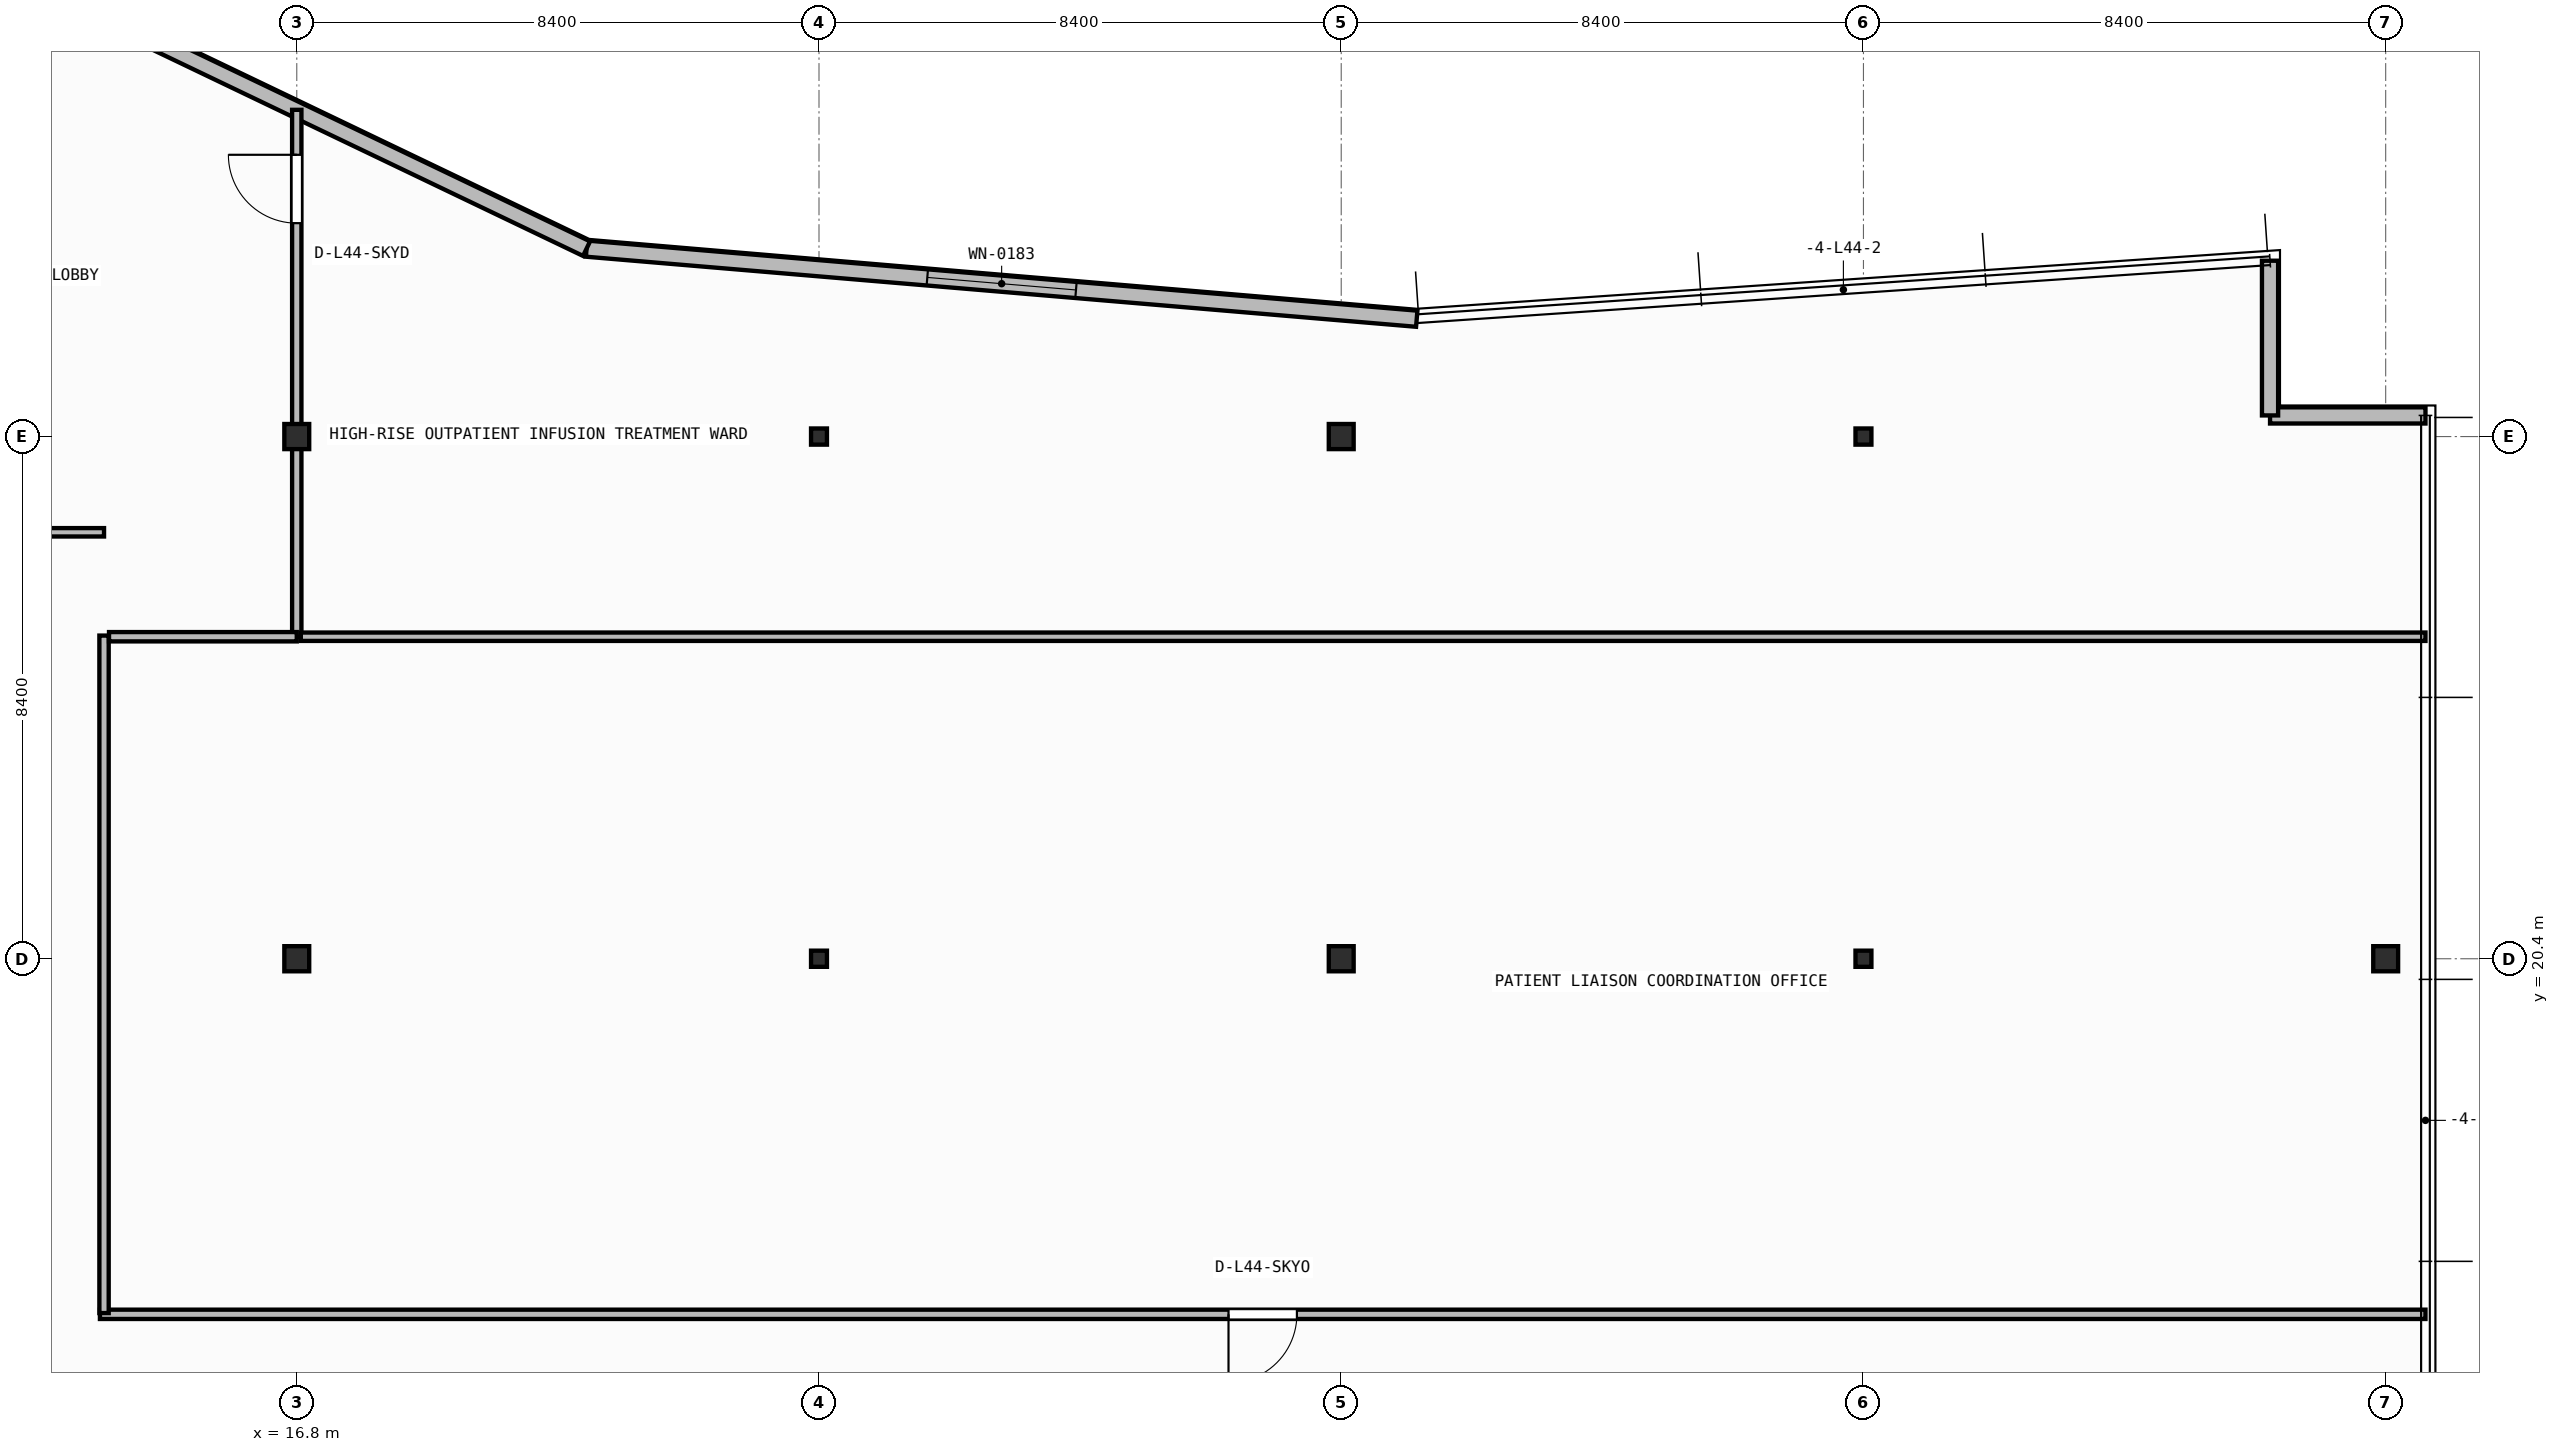
"""IFC4 building model, lengths in metres.
Left out: names, types, materials, properties, quantities, classifications, styles, units other than length and angle.
Written with IfcOpenShell. Run it as: python <this file> out.ifc"""

import sys

from ifc_helpers import new_model, si_unit, direction, frame, frame_2d, origin, origin_2d, place, context, subcontext, project, spatial, rectangle, i_section, extrude, element, fill, save


model = new_model("IFC4")
c1 = context("Model", 3, precision=1e-05, world=origin(), true_north=direction((0.0, 1.0)))
c2 = subcontext(c1, "Body", "Model", "MODEL_VIEW")
j1 = project(units=[si_unit("LENGTHUNIT", "METRE"), si_unit("PLANEANGLEUNIT", "RADIAN")], contexts=[c1])
p1 = place(None, origin())
s1 = spatial("IfcSite", under=j1, at=p1, CompositionType="ELEMENT")
p2 = place(p1, origin())
s2 = spatial("IfcBuilding", under=s1, at=p2, CompositionType="ELEMENT")
p3 = place(p2, frame((0.0, 0.0, 180.25)))
s3 = spatial("IfcBuildingStorey", under=s2, at=p3, CompositionType="ELEMENT", Elevation=180.25)
p4 = place(p3, frame((16.8, 20.4, 0.0), z_axis=(0.0, 0.0, 1.0), x_axis=(1.0, 0.0, 0.0)))
e1 = element("IfcColumn", 1, at=p4, inside=s3, PredefinedType="COLUMN", context=c2, shape_type="SweptSolid", body=[
    extrude(i_section(OverallWidth=0.4, OverallDepth=0.404, WebThickness=0.02, FlangeThickness=0.032, at=origin_2d()), origin(), (0.0, 0.0, 1.0), 3.95),
])
p5 = place(p3, frame((25.2, 20.4, 0.0), z_axis=(0.0, 0.0, 1.0), x_axis=(1.0, 0.0, 0.0)))
e2 = element("IfcColumn", 2, at=p5, inside=s3, PredefinedType="COLUMN", context=c2, shape_type="SweptSolid", body=[
    extrude(i_section(OverallWidth=0.256, OverallDepth=0.26, WebThickness=0.01, FlangeThickness=0.017, FilletRadius=0.013, at=origin_2d()), origin(), (0.0, 0.0, 1.0), 3.95),
])
p6 = place(p3, frame((33.6, 20.4, 0.0), z_axis=(0.0, 0.0, 1.0), x_axis=(1.0, 0.0, 0.0)))
e3 = element("IfcColumn", 3, at=p6, inside=s3, PredefinedType="COLUMN", context=c2, shape_type="SweptSolid", body=[
    extrude(i_section(OverallWidth=0.4, OverallDepth=0.404, WebThickness=0.02, FlangeThickness=0.032, at=origin_2d()), origin(), (0.0, 0.0, 1.0), 3.95),
])
p7 = place(p3, frame((42.0, 20.4, 0.0), z_axis=(0.0, 0.0, 1.0), x_axis=(1.0, 0.0, 0.0)))
e4 = element("IfcColumn", 4, at=p7, inside=s3, PredefinedType="COLUMN", context=c2, shape_type="SweptSolid", body=[
    extrude(i_section(OverallWidth=0.256, OverallDepth=0.26, WebThickness=0.01, FlangeThickness=0.017, FilletRadius=0.013, at=origin_2d()), origin(), (0.0, 0.0, 1.0), 3.95),
])
for number, where, z_axis, x_axis in (
    (5, (50.4, 20.4, 0.0), (0.0, 0.0, 1.0), (1.0, 0.0, 0.0)),
    (6, (16.8, 28.8, 0.0), (0.0, 0.0, 1.0), (1.0, 0.0, 0.0)),
):
    element("IfcColumn", number, at=place(p3, frame(where, z_axis=z_axis, x_axis=x_axis)), inside=s3, PredefinedType="COLUMN", context=c2, shape_type="SweptSolid", body=[
        extrude(i_section(OverallWidth=0.4, OverallDepth=0.404, WebThickness=0.02, FlangeThickness=0.032, at=origin_2d()), origin(), (0.0, 0.0, 1.0), 3.95),
    ])
p8 = place(p3, frame((25.2, 28.8, 0.0), z_axis=(0.0, 0.0, 1.0), x_axis=(1.0, 0.0, 0.0)))
e7 = element("IfcColumn", 7, at=p8, inside=s3, PredefinedType="COLUMN", context=c2, shape_type="SweptSolid", body=[
    extrude(i_section(OverallWidth=0.256, OverallDepth=0.26, WebThickness=0.01, FlangeThickness=0.017, FilletRadius=0.013, at=origin_2d()), origin(), (0.0, 0.0, 1.0), 3.95),
])
p9 = place(p3, frame((33.6, 28.8, 0.0), z_axis=(0.0, 0.0, 1.0), x_axis=(1.0, 0.0, 0.0)))
e8 = element("IfcColumn", 8, at=p9, inside=s3, PredefinedType="COLUMN", context=c2, shape_type="SweptSolid", body=[
    extrude(i_section(OverallWidth=0.4, OverallDepth=0.404, WebThickness=0.02, FlangeThickness=0.032, at=origin_2d()), origin(), (0.0, 0.0, 1.0), 3.95),
])
p10 = place(p3, frame((42.0, 28.8, 0.0), z_axis=(0.0, 0.0, 1.0), x_axis=(1.0, 0.0, 0.0)))
e9 = element("IfcColumn", 9, at=p10, inside=s3, PredefinedType="COLUMN", context=c2, shape_type="SweptSolid", body=[
    extrude(i_section(OverallWidth=0.256, OverallDepth=0.26, WebThickness=0.01, FlangeThickness=0.017, FilletRadius=0.013, at=origin_2d()), origin(), (0.0, 0.0, 1.0), 3.95),
])
p11 = place(p3, frame((51.04, 29.14, 0.0), z_axis=(0.0, 0.0, 1.0), x_axis=(-1.0, 0.0, 0.0)))
e10 = element("IfcWall", 10, at=p11, inside=s3, PredefinedType="STANDARD", context=c2, shape_type="SweptSolid", body=[
    extrude(rectangle(XDim=2.5, YDim=0.26, at=frame_2d((1.25, 0.0))), origin(), (0.0, 0.0, 1.0), 3.71),
])
p12 = place(p3, frame((48.54, 29.14, 0.0), z_axis=(0.0, 0.0, 1.0), x_axis=(0.0, 1.0, 0.0)))
e11 = element("IfcWall", 11, at=p12, inside=s3, PredefinedType="STANDARD", context=c2, shape_type="SweptSolid", body=[
    extrude(rectangle(XDim=2.489, YDim=0.26, at=frame_2d((1.245, 0.0))), origin(), (0.0, 0.0, 1.0), 3.71),
])
p13 = place(p3, frame((34.815, 30.696, 0.0), z_axis=(0.0, 0.0, 1.0), x_axis=(-0.996454704935, 0.084130975344, 0.0)))
e12 = element("IfcWall", 12, at=p13, inside=s3, PredefinedType="STANDARD", context=c2, shape_type="SweptSolid", body=[
    extrude(rectangle(XDim=13.401, YDim=0.26, at=frame_2d((6.701, 0.0))), origin(), (0.0, 0.0, 1.0), 3.71),
])
p14 = place(p13, frame((5.5, 0.0, 0.9)))
e13 = element("IfcOpeningElement", 13, at=p14, cuts=e12, PredefinedType="OPENING", context=c2, shape_type="SweptSolid", body=[
    extrude(rectangle(XDim=2.4, YDim=1.65, at=frame_2d((1.2, 0.825))), frame((0.0, 0.14, 0.0), z_axis=(0.0, -1.0, 0.0), x_axis=(1.0, 0.0, 0.0)), (0.0, 0.0, 1.0), 0.28),
])
p15 = place(p3, frame((21.461, 31.823, 0.0), z_axis=(0.0, 0.0, 1.0), x_axis=(-0.901858094827, 0.432032379336, 0.0)))
e14 = element("IfcWall", 14, at=p15, inside=s3, PredefinedType="STANDARD", context=c2, shape_type="SweptSolid", body=[
    extrude(rectangle(XDim=12.532, YDim=0.26, at=frame_2d((6.266, 0.0))), origin(), (0.0, 0.0, 1.0), 3.71),
])
p16 = place(p15, frame((7.66, 0.0, 0.9)))
e15 = element("IfcOpeningElement", 15, at=p16, cuts=e14, PredefinedType="OPENING", context=c2, shape_type="SweptSolid", body=[
    extrude(rectangle(XDim=2.4, YDim=1.65, at=frame_2d((1.2, 0.825))), frame((0.0, 0.14, 0.0), z_axis=(0.0, -1.0, 0.0), x_axis=(1.0, 0.0, 0.0)), (0.0, 0.0, 1.0), 0.28),
])
p17 = place(p3, frame((51.04, 14.68, 0.0), z_axis=(0.0, 0.0, 1.0), x_axis=(-1.0, 0.0, 0.0)))
e16 = element("IfcWall", 16, at=p17, inside=s3, PredefinedType="PARTITIONING", context=c2, shape_type="SweptSolid", body=[
    extrude(rectangle(XDim=37.406, YDim=0.15, at=frame_2d((18.703, 0.0))), origin(), (0.0, 0.0, 1.0), 3.71),
])
p18 = place(p17, frame((18.153, 0.0, 0.0)))
e17 = element("IfcOpeningElement", 17, at=p18, cuts=e16, PredefinedType="OPENING", context=c2, shape_type="SweptSolid", body=[
    extrude(rectangle(XDim=1.1, YDim=2.1, at=frame_2d((0.55, 1.05))), frame((0.0, 0.085, 0.0), z_axis=(0.0, -1.0, 0.0), x_axis=(1.0, 0.0, 0.0)), (0.0, 0.0, 1.0), 0.17),
])
p19 = place(p3, frame((13.7, 27.26, 0.0), z_axis=(0.0, 0.0, 1.0), x_axis=(-1.0, 0.0, 0.0)))
e18 = element("IfcWall", 18, at=p19, inside=s3, PredefinedType="PARTITIONING", context=c2, shape_type="SweptSolid", body=[
    extrude(rectangle(XDim=2.5, YDim=0.135, at=frame_2d((1.25, 0.0))), origin(), (0.0, 0.0, 1.0), 3.71),
])
p20 = place(p3, frame((13.7, 14.7, 0.0), z_axis=(0.0, 0.0, 1.0), x_axis=(0.0, 1.0, 0.0)))
e19 = element("IfcWall", 19, at=p20, inside=s3, PredefinedType="PARTITIONING", context=c2, shape_type="SweptSolid", body=[
    extrude(rectangle(XDim=10.898, YDim=0.15, at=frame_2d((5.449, 0.0))), origin(), (0.0, 0.0, 1.0), 3.71),
])
p21 = place(p3, frame((16.8, 25.58, 0.0), z_axis=(0.0, 0.0, 1.0), x_axis=(0.0, 1.0, 0.0)))
e20 = element("IfcWall", 20, at=p21, inside=s3, PredefinedType="PARTITIONING", context=c2, shape_type="SweptSolid", body=[
    extrude(rectangle(XDim=8.476, YDim=0.15, at=frame_2d((4.238, 0.0))), origin(), (0.0, 0.0, 1.0), 3.152),
])
p22 = place(p21, frame((6.653, 0.0, 0.0)))
e21 = element("IfcOpeningElement", 21, at=p22, cuts=e20, PredefinedType="OPENING", context=c2, shape_type="SweptSolid", body=[
    extrude(rectangle(XDim=1.1, YDim=2.1, at=frame_2d((0.55, 1.05))), frame((0.0, 0.085, 0.0), z_axis=(0.0, -1.0, 0.0), x_axis=(1.0, 0.0, 0.0)), (0.0, 0.0, 1.0), 0.17),
])
p23 = place(p3, frame((13.78, 25.58, 0.0), z_axis=(0.0, 0.0, 1.0), x_axis=(1.0, 0.0, 0.0)))
e22 = element("IfcWall", 22, at=p23, inside=s3, PredefinedType="PARTITIONING", context=c2, shape_type="SweptSolid", body=[
    extrude(rectangle(XDim=3.02, YDim=0.15, at=frame_2d((1.51, 0.0))), origin(), (0.0, 0.0, 1.0), 3.71),
])
p24 = place(p3, frame((16.865, 25.58, 0.0), z_axis=(0.0, 0.0, 1.0), x_axis=(1.0, 0.0, 0.0)))
e23 = element("IfcWall", 23, at=p24, inside=s3, PredefinedType="PARTITIONING", context=c2, shape_type="SweptSolid", body=[
    extrude(rectangle(XDim=34.175, YDim=0.135, at=frame_2d((17.087, 0.0))), origin(), (0.0, 0.0, 1.0), 3.71),
])
p25 = place(p14, origin())
e24 = element("IfcWindow", 24, at=p25, inside=s3, PartitioningType="SINGLE_PANEL", PredefinedType="WINDOW", context=c2, shape_type="SweptSolid", body=[
    extrude(rectangle(XDim=2.4, YDim=1.65, at=frame_2d((1.2, 0.825))), frame((0.0, 0.03, 0.0), z_axis=(0.0, -1.0, 0.0), x_axis=(1.0, 0.0, 0.0)), (0.0, 0.0, 1.0), 0.06),
])
fill(e13, e24)
p26 = place(p18, origin())
e25 = element("IfcDoor", 25, at=p26, inside=s3, OperationType="SINGLE_SWING_RIGHT", PredefinedType="DOOR", context=c2, shape_type="SweptSolid", body=[
    extrude(rectangle(XDim=1.1, YDim=2.1, at=frame_2d((0.55, 1.05))), frame((0.0, 0.025, 0.0), z_axis=(0.0, -1.0, 0.0), x_axis=(1.0, 0.0, 0.0)), (0.0, 0.0, 1.0), 0.05),
])
fill(e17, e25)
p27 = place(p22, origin())
e26 = element("IfcDoor", 26, at=p27, inside=s3, OperationType="SINGLE_SWING_RIGHT", PredefinedType="DOOR", context=c2, shape_type="SweptSolid", body=[
    extrude(rectangle(XDim=1.1, YDim=2.1, at=frame_2d((0.55, 1.05))), frame((0.0, 0.025, 0.0), z_axis=(0.0, -1.0, 0.0), x_axis=(1.0, 0.0, 0.0)), (0.0, 0.0, 1.0), 0.05),
])
fill(e21, e26)
save(model, sys.argv[1])
